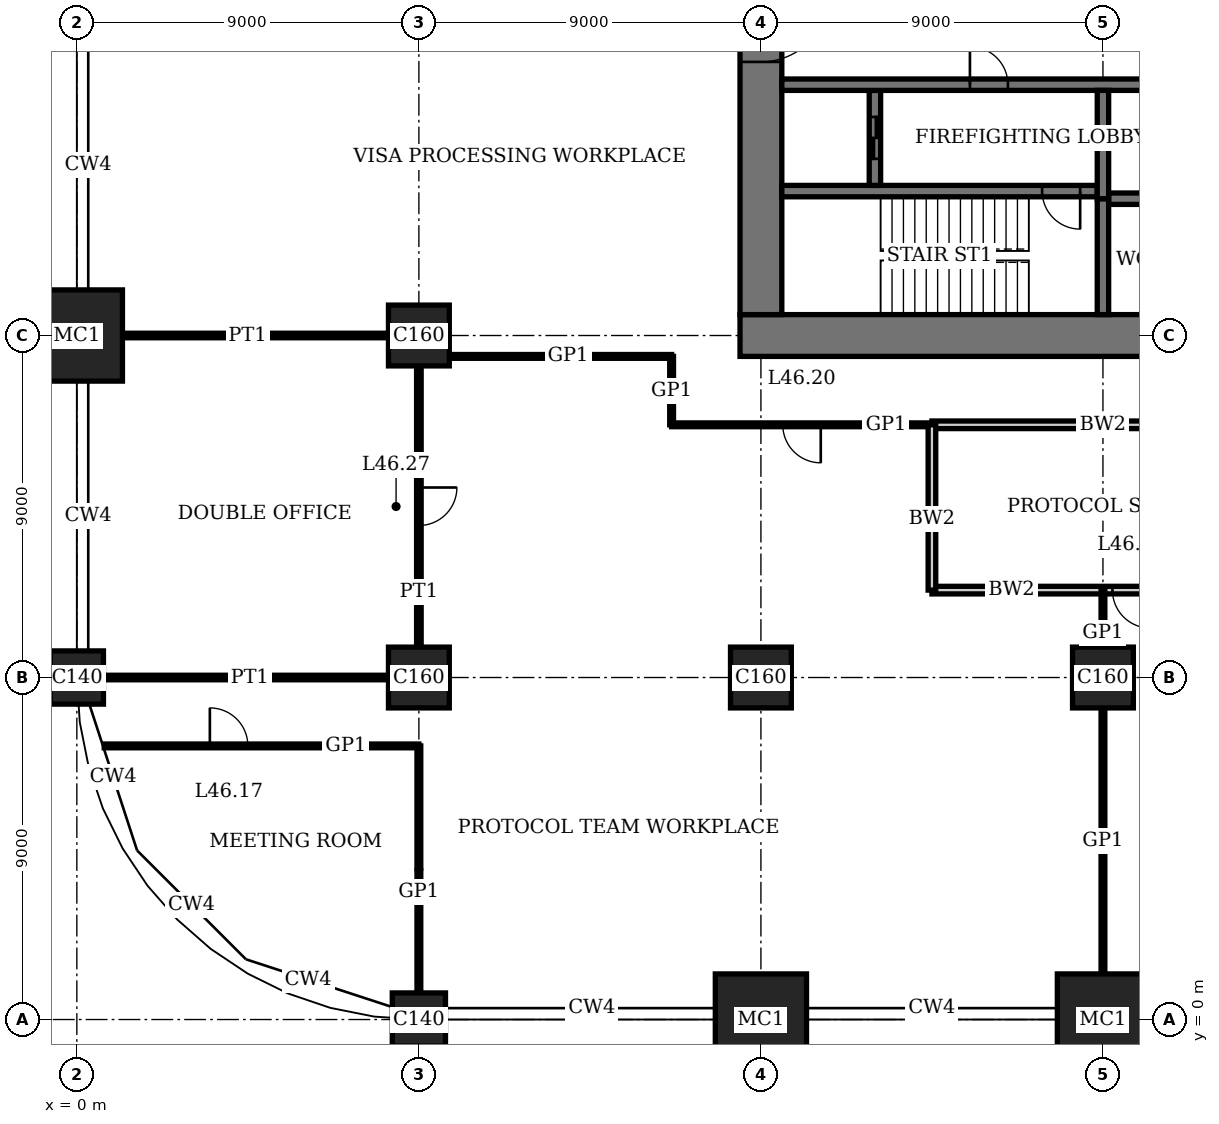
"""IFC4 building model, lengths in metres.
Left out: names, types, materials, properties, quantities, classifications, styles, units other than length and angle.
Written with IfcOpenShell. Run it as: python <this file> out.ifc"""

import sys

from ifc_helpers import new_model, si_unit, direction, frame, frame_2d, origin, origin_2d, place, context, subcontext, project, spatial, rectangle, extrude, element, fill, save


model = new_model("IFC4")
c1 = context("Model", 3, precision=1e-05, world=origin(), true_north=direction((0.0, 1.0)))
c2 = subcontext(c1, "Body", "Model", "MODEL_VIEW")
j1 = project(units=[si_unit("LENGTHUNIT", "METRE"), si_unit("PLANEANGLEUNIT", "RADIAN")], contexts=[c1])
p1 = place(None, origin())
s1 = spatial("IfcSite", under=j1, at=p1, CompositionType="ELEMENT")
p2 = place(p1, origin())
s2 = spatial("IfcBuilding", under=s1, at=p2, CompositionType="ELEMENT")
p3 = place(p2, frame((0.0, 0.0, 190.2)))
s3 = spatial("IfcBuildingStorey", under=s2, at=p3, CompositionType="ELEMENT", Elevation=190.2)
p4 = place(p3, frame((0.0, 9.0, 0.0), z_axis=(0.0, 0.0, 1.0), x_axis=(1.0, 0.0, 0.0)))
e1 = element("IfcColumn", 1, at=p4, inside=s3, PredefinedType="COLUMN", context=c2, shape_type="SweptSolid", body=[
    extrude(rectangle(XDim=1.4, YDim=1.4, at=origin_2d()), origin(), (0.0, 0.0, 1.0), 4.0),
])
p5 = place(p3, frame((0.0, 18.0, 0.0), z_axis=(0.0, 0.0, 1.0), x_axis=(1.0, 0.0, 0.0)))
e2 = element("IfcColumn", 2, at=p5, inside=s3, PredefinedType="COLUMN", context=c2, shape_type="SweptSolid", body=[
    extrude(rectangle(XDim=2.4, YDim=2.4, at=origin_2d()), origin(), (0.0, 0.0, 1.0), 4.0),
])
p6 = place(p3, frame((9.0, 0.0, 0.0), z_axis=(0.0, 0.0, 1.0), x_axis=(1.0, 0.0, 0.0)))
e3 = element("IfcColumn", 3, at=p6, inside=s3, PredefinedType="COLUMN", context=c2, shape_type="SweptSolid", body=[
    extrude(rectangle(XDim=1.4, YDim=1.4, at=origin_2d()), origin(), (0.0, 0.0, 1.0), 4.0),
])
for number, where, z_axis, x_axis in (
    (4, (9.0, 9.0, 0.0), (0.0, 0.0, 1.0), (1.0, 0.0, 0.0)),
    (5, (9.0, 18.0, 0.0), (0.0, 0.0, 1.0), (1.0, 0.0, 0.0)),
):
    element("IfcColumn", number, at=place(p3, frame(where, z_axis=z_axis, x_axis=x_axis)), inside=s3, PredefinedType="COLUMN", context=c2, shape_type="SweptSolid", body=[
        extrude(rectangle(XDim=1.6, YDim=1.6, at=origin_2d()), origin(), (0.0, 0.0, 1.0), 4.0),
    ])
p7 = place(p3, frame((18.0, 0.0, 0.0), z_axis=(0.0, 0.0, 1.0), x_axis=(1.0, 0.0, 0.0)))
e6 = element("IfcColumn", 6, at=p7, inside=s3, PredefinedType="COLUMN", context=c2, shape_type="SweptSolid", body=[
    extrude(rectangle(XDim=2.4, YDim=2.4, at=origin_2d()), origin(), (0.0, 0.0, 1.0), 4.0),
])
p8 = place(p3, frame((18.0, 9.0, 0.0), z_axis=(0.0, 0.0, 1.0), x_axis=(1.0, 0.0, 0.0)))
e7 = element("IfcColumn", 7, at=p8, inside=s3, PredefinedType="COLUMN", context=c2, shape_type="SweptSolid", body=[
    extrude(rectangle(XDim=1.6, YDim=1.6, at=origin_2d()), origin(), (0.0, 0.0, 1.0), 4.0),
])
p9 = place(p3, frame((27.0, 0.0, 0.0), z_axis=(0.0, 0.0, 1.0), x_axis=(1.0, 0.0, 0.0)))
e8 = element("IfcColumn", 8, at=p9, inside=s3, PredefinedType="COLUMN", context=c2, shape_type="SweptSolid", body=[
    extrude(rectangle(XDim=2.4, YDim=2.4, at=origin_2d()), origin(), (0.0, 0.0, 1.0), 4.0),
])
p10 = place(p3, frame((27.0, 9.0, 0.0), z_axis=(0.0, 0.0, 1.0), x_axis=(1.0, 0.0, 0.0)))
e9 = element("IfcColumn", 9, at=p10, inside=s3, PredefinedType="COLUMN", context=c2, shape_type="SweptSolid", body=[
    extrude(rectangle(XDim=1.6, YDim=1.6, at=origin_2d()), origin(), (0.0, 0.0, 1.0), 4.0),
])
p11 = place(p3, frame((17.45, 18.0, 0.0), z_axis=(0.0, 0.0, 1.0), x_axis=(1.0, 0.0, 0.0)))
e10 = element("IfcWall", 10, at=p11, inside=s3, PredefinedType="SHEAR", context=c2, shape_type="SweptSolid", body=[
    extrude(rectangle(XDim=28.1, YDim=1.1, at=frame_2d((14.05, 0.0))), origin(), (0.0, 0.0, 1.0), 4.0),
])
p12 = place(p11, frame((11.55, 0.0, 0.0)))
e11 = element("IfcOpeningElement", 11, at=p12, cuts=e10, PredefinedType="OPENING", context=c2, shape_type="SweptSolid", body=[
    extrude(rectangle(XDim=1.0, YDim=2.4, at=frame_2d((0.5, 1.2))), frame((0.0, 0.56, 0.0), z_axis=(0.0, -1.0, 0.0), x_axis=(1.0, 0.0, 0.0)), (0.0, 0.0, 1.0), 1.12),
])
p13 = place(p11, frame((16.55, 0.0, 0.0)))
e12 = element("IfcOpeningElement", 12, at=p13, cuts=e10, PredefinedType="OPENING", context=c2, shape_type="SweptSolid", body=[
    extrude(rectangle(XDim=1.0, YDim=2.4, at=frame_2d((0.5, 1.2))), frame((0.0, 0.56, 0.0), z_axis=(0.0, -1.0, 0.0), x_axis=(1.0, 0.0, 0.0)), (0.0, 0.0, 1.0), 1.12),
])
p14 = place(p11, frame((20.0, 0.0, 0.0)))
e13 = element("IfcOpeningElement", 13, at=p14, cuts=e10, PredefinedType="OPENING", context=c2, shape_type="SweptSolid", body=[
    extrude(rectangle(XDim=1.1, YDim=2.4, at=frame_2d((0.55, 1.2))), frame((0.0, 0.56, 0.0), z_axis=(0.0, -1.0, 0.0), x_axis=(1.0, 0.0, 0.0)), (0.0, 0.0, 1.0), 1.12),
])
p15 = place(p11, frame((24.05, 0.0, 0.0)))
e14 = element("IfcOpeningElement", 14, at=p15, cuts=e10, PredefinedType="OPENING", context=c2, shape_type="SweptSolid", body=[
    extrude(rectangle(XDim=1.0, YDim=2.4, at=frame_2d((0.5, 1.2))), frame((0.0, 0.56, 0.0), z_axis=(0.0, -1.0, 0.0), x_axis=(1.0, 0.0, 0.0)), (0.0, 0.0, 1.0), 1.12),
])
p16 = place(p3, frame((18.0, 35.45, 0.0), z_axis=(0.0, 0.0, 1.0), x_axis=(0.0, -1.0, 0.0)))
e15 = element("IfcWall", 15, at=p16, inside=s3, PredefinedType="SHEAR", context=c2, shape_type="SweptSolid", body=[
    extrude(rectangle(XDim=16.9, YDim=1.1, at=frame_2d((8.45, 0.0))), origin(), (0.0, 0.0, 1.0), 4.0),
])
p17 = place(p16, frame((8.45, 0.0, 0.0)))
e16 = element("IfcOpeningElement", 16, at=p17, cuts=e15, PredefinedType="OPENING", context=c2, shape_type="SweptSolid", body=[
    extrude(rectangle(XDim=1.8, YDim=2.4, at=frame_2d((0.9, 1.2))), frame((0.0, 0.56, 0.0), z_axis=(0.0, -1.0, 0.0), x_axis=(1.0, 0.0, 0.0)), (0.0, 0.0, 1.0), 1.12),
])
p18 = place(p3, frame((18.55, 21.8, 0.0), z_axis=(0.0, 0.0, 1.0), x_axis=(1.0, 0.0, 0.0)))
e17 = element("IfcWall", 17, at=p18, inside=s3, PredefinedType="SHEAR", context=c2, shape_type="SweptSolid", body=[
    extrude(rectangle(XDim=8.3, YDim=0.3, at=frame_2d((4.15, 0.0))), origin(), (0.0, 0.0, 1.0), 4.0),
])
p19 = place(p18, frame((6.85, 0.0, 0.0)))
e18 = element("IfcOpeningElement", 18, at=p19, cuts=e17, PredefinedType="OPENING", context=c2, shape_type="SweptSolid", body=[
    extrude(rectangle(XDim=1.0, YDim=2.4, at=frame_2d((0.5, 1.2))), frame((0.0, 0.16, 0.0), z_axis=(0.0, -1.0, 0.0), x_axis=(1.0, 0.0, 0.0)), (0.0, 0.0, 1.0), 0.32),
])
p20 = place(p3, frame((27.0, 18.55, 0.0), z_axis=(0.0, 0.0, 1.0), x_axis=(0.0, 1.0, 0.0)))
e19 = element("IfcWall", 19, at=p20, inside=s3, PredefinedType="SHEAR", context=c2, shape_type="SweptSolid", body=[
    extrude(rectangle(XDim=3.05, YDim=0.3, at=frame_2d((1.525, 0.0))), origin(), (0.0, 0.0, 1.0), 4.0),
])
p21 = place(p3, frame((21.0, 21.95, 0.0), z_axis=(0.0, 0.0, 1.0), x_axis=(0.0, 1.0, 0.0)))
e20 = element("IfcWall", 20, at=p21, inside=s3, PredefinedType="SHEAR", context=c2, shape_type="SweptSolid", body=[
    extrude(rectangle(XDim=2.5, YDim=0.3, at=frame_2d((1.25, 0.0))), origin(), (0.0, 0.0, 1.0), 4.0),
])
p22 = place(p21, frame((0.7, 0.0, 0.0)))
e21 = element("IfcOpeningElement", 21, at=p22, cuts=e20, PredefinedType="OPENING", context=c2, shape_type="SweptSolid", body=[
    extrude(rectangle(XDim=1.1, YDim=2.4, at=frame_2d((0.55, 1.2))), frame((0.0, 0.16, 0.0), z_axis=(0.0, -1.0, 0.0), x_axis=(1.0, 0.0, 0.0)), (0.0, 0.0, 1.0), 0.32),
])
p23 = place(p3, frame((18.55, 24.6, 0.0), z_axis=(0.0, 0.0, 1.0), x_axis=(1.0, 0.0, 0.0)))
e22 = element("IfcWall", 22, at=p23, inside=s3, PredefinedType="SHEAR", context=c2, shape_type="SweptSolid", body=[
    extrude(rectangle(XDim=25.9, YDim=0.3, at=frame_2d((12.95, 0.0))), origin(), (0.0, 0.0, 1.0), 4.0),
])
p24 = place(p23, frame((4.95, 0.0, 0.0)))
e23 = element("IfcOpeningElement", 23, at=p24, cuts=e22, PredefinedType="OPENING", context=c2, shape_type="SweptSolid", body=[
    extrude(rectangle(XDim=1.0, YDim=2.4, at=frame_2d((0.5, 1.2))), frame((0.0, 0.16, 0.0), z_axis=(0.0, -1.0, 0.0), x_axis=(1.0, 0.0, 0.0)), (0.0, 0.0, 1.0), 0.32),
])
p25 = place(p23, frame((24.5, 0.0, 0.0)))
e24 = element("IfcOpeningElement", 24, at=p25, cuts=e22, PredefinedType="OPENING", context=c2, shape_type="SweptSolid", body=[
    extrude(rectangle(XDim=0.9, YDim=2.1, at=frame_2d((0.45, 1.05))), frame((0.0, 0.16, 0.0), z_axis=(0.0, -1.0, 0.0), x_axis=(1.0, 0.0, 0.0)), (0.0, 0.0, 1.0), 0.32),
])
p26 = place(p23, frame((21.3, 0.0, 0.0)))
e25 = element("IfcOpeningElement", 25, at=p26, cuts=e22, PredefinedType="OPENING", context=c2, shape_type="SweptSolid", body=[
    extrude(rectangle(XDim=1.3, YDim=2.4, at=frame_2d((0.65, 1.2))), frame((0.0, 0.16, 0.0), z_axis=(0.0, -1.0, 0.0), x_axis=(1.0, 0.0, 0.0)), (0.0, 0.0, 1.0), 0.32),
])
p27 = place(p3, frame((27.15, 21.6, 0.0), z_axis=(0.0, 0.0, 1.0), x_axis=(1.0, 0.0, 0.0)))
e26 = element("IfcWall", 26, at=p27, inside=s3, PredefinedType="SHEAR", context=c2, shape_type="SweptSolid", body=[
    extrude(rectangle(XDim=17.3, YDim=0.3, at=frame_2d((8.65, 0.0))), origin(), (0.0, 0.0, 1.0), 4.0),
])
p28 = place(p3, frame((27.0, 21.6, 0.0), z_axis=(0.0, 0.0, 1.0), x_axis=(0.0, 1.0, 0.0)))
e27 = element("IfcWall", 27, at=p28, inside=s3, PredefinedType="SHEAR", context=c2, shape_type="SweptSolid", body=[
    extrude(rectangle(XDim=2.85, YDim=0.3, at=frame_2d((1.425, 0.0))), origin(), (0.0, 0.0, 1.0), 4.0),
])
p29 = place(p3, frame((0.72, 7.2, 0.0), z_axis=(0.0, 0.0, 1.0), x_axis=(1.0, 0.0, 0.0)))
e28 = element("IfcWall", 28, at=p29, inside=s3, PredefinedType="PARTITIONING", context=c2, shape_type="SweptSolid", body=[
    extrude(rectangle(XDim=8.28, YDim=0.1, at=frame_2d((4.14, 0.0))), origin(), (0.0, 0.0, 1.0), 3.75),
])
p30 = place(p29, frame((2.78, 0.0, 0.0)))
e29 = element("IfcOpeningElement", 29, at=p30, cuts=e28, PredefinedType="OPENING", context=c2, shape_type="SweptSolid", body=[
    extrude(rectangle(XDim=1.0, YDim=2.4, at=frame_2d((0.5, 1.2))), frame((0.0, 0.06, 0.0), z_axis=(0.0, -1.0, 0.0), x_axis=(1.0, 0.0, 0.0)), (0.0, 0.0, 1.0), 0.12),
])
p31 = place(p3, frame((0.7, 9.0, 0.0), z_axis=(0.0, 0.0, 1.0), x_axis=(1.0, 0.0, 0.0)))
e30 = element("IfcWall", 30, at=p31, inside=s3, PredefinedType="PARTITIONING", context=c2, shape_type="SweptSolid", body=[
    extrude(rectangle(XDim=7.5, YDim=0.12, at=frame_2d((3.75, 0.0))), origin(), (0.0, 0.0, 1.0), 3.05),
])
p32 = place(p3, frame((22.5, 11.3, 0.0), z_axis=(0.0, 0.0, 1.0), x_axis=(1.0, 0.0, 0.0)))
e31 = element("IfcWall", 31, at=p32, inside=s3, PredefinedType="SOLIDWALL", context=c2, shape_type="SweptSolid", body=[
    extrude(rectangle(XDim=9.0, YDim=0.2, at=frame_2d((4.5, 0.0))), origin(), (0.0, 0.0, 1.0), 3.75),
])
p33 = place(p32, frame((4.75, 0.0, 0.0)))
e32 = element("IfcOpeningElement", 32, at=p33, cuts=e31, PredefinedType="OPENING", context=c2, shape_type="SweptSolid", body=[
    extrude(rectangle(XDim=1.0, YDim=2.4, at=frame_2d((0.5, 1.2))), frame((0.0, 0.11, 0.0), z_axis=(0.0, -1.0, 0.0), x_axis=(1.0, 0.0, 0.0)), (0.0, 0.0, 1.0), 0.22),
])
p34 = place(p3, frame((22.5, 15.65, 0.0), z_axis=(0.0, 0.0, 1.0), x_axis=(1.0, 0.0, 0.0)))
e33 = element("IfcWall", 33, at=p34, inside=s3, PredefinedType="SOLIDWALL", context=c2, shape_type="SweptSolid", body=[
    extrude(rectangle(XDim=9.0, YDim=0.2, at=frame_2d((4.5, 0.0))), origin(), (0.0, 0.0, 1.0), 3.75),
])
p35 = place(p3, frame((15.65, 15.65, 0.0), z_axis=(0.0, 0.0, 1.0), x_axis=(1.0, 0.0, 0.0)))
e34 = element("IfcWall", 34, at=p35, inside=s3, PredefinedType="PARTITIONING", context=c2, shape_type="SweptSolid", body=[
    extrude(rectangle(XDim=6.85, YDim=0.1, at=frame_2d((3.425, 0.0))), origin(), (0.0, 0.0, 1.0), 3.75),
])
p36 = place(p35, frame((2.925, 0.0, 0.0)))
e35 = element("IfcOpeningElement", 35, at=p36, cuts=e34, PredefinedType="OPENING", context=c2, shape_type="SweptSolid", body=[
    extrude(rectangle(XDim=1.0, YDim=2.4, at=frame_2d((0.5, 1.2))), frame((0.0, 0.06, 0.0), z_axis=(0.0, -1.0, 0.0), x_axis=(1.0, 0.0, 0.0)), (0.0, 0.0, 1.0), 0.12),
])
p37 = place(p3, frame((9.8, 17.45, 0.0), z_axis=(0.0, 0.0, 1.0), x_axis=(1.0, 0.0, 0.0)))
e36 = element("IfcWall", 36, at=p37, inside=s3, PredefinedType="PARTITIONING", context=c2, shape_type="SweptSolid", body=[
    extrude(rectangle(XDim=5.85, YDim=0.1, at=frame_2d((2.925, 0.0))), origin(), (0.0, 0.0, 1.0), 3.75),
])
p38 = place(p3, frame((1.2, 18.0, 0.0), z_axis=(0.0, 0.0, 1.0), x_axis=(1.0, 0.0, 0.0)))
e37 = element("IfcWall", 37, at=p38, inside=s3, PredefinedType="PARTITIONING", context=c2, shape_type="SweptSolid", body=[
    extrude(rectangle(XDim=7.0, YDim=0.12, at=frame_2d((3.5, 0.0))), origin(), (0.0, 0.0, 1.0), 3.05),
])
p39 = place(p3, frame((9.0, 9.8, 0.0), z_axis=(0.0, 0.0, 1.0), x_axis=(0.0, 1.0, 0.0)))
e38 = element("IfcWall", 38, at=p39, inside=s3, PredefinedType="PARTITIONING", context=c2, shape_type="SweptSolid", body=[
    extrude(rectangle(XDim=7.4, YDim=0.12, at=frame_2d((3.7, 0.0))), origin(), (0.0, 0.0, 1.0), 3.05),
])
p40 = place(p39, frame((3.2, 0.0, 0.0)))
e39 = element("IfcOpeningElement", 39, at=p40, cuts=e38, PredefinedType="OPENING", context=c2, shape_type="SweptSolid", body=[
    extrude(rectangle(XDim=1.0, YDim=2.4, at=frame_2d((0.5, 1.2))), frame((0.0, 0.07, 0.0), z_axis=(0.0, -1.0, 0.0), x_axis=(1.0, 0.0, 0.0)), (0.0, 0.0, 1.0), 0.14),
])
p41 = place(p3, frame((9.0, 0.7, 0.0), z_axis=(0.0, 0.0, 1.0), x_axis=(0.0, 1.0, 0.0)))
e40 = element("IfcWall", 40, at=p41, inside=s3, PredefinedType="PARTITIONING", context=c2, shape_type="SweptSolid", body=[
    extrude(rectangle(XDim=6.5, YDim=0.1, at=frame_2d((3.25, 0.0))), origin(), (0.0, 0.0, 1.0), 3.05),
])
p42 = place(p3, frame((15.65, 15.65, 0.0), z_axis=(0.0, 0.0, 1.0), x_axis=(0.0, 1.0, 0.0)))
e41 = element("IfcWall", 41, at=p42, inside=s3, PredefinedType="PARTITIONING", context=c2, shape_type="SweptSolid", body=[
    extrude(rectangle(XDim=1.8, YDim=0.1, at=frame_2d((0.9, 0.0))), origin(), (0.0, 0.0, 1.0), 3.75),
])
p43 = place(p3, frame((22.5, 11.3, 0.0), z_axis=(0.0, 0.0, 1.0), x_axis=(0.0, 1.0, 0.0)))
e42 = element("IfcWall", 42, at=p43, inside=s3, PredefinedType="SOLIDWALL", context=c2, shape_type="SweptSolid", body=[
    extrude(rectangle(XDim=4.35, YDim=0.2, at=frame_2d((2.175, 0.0))), origin(), (0.0, 0.0, 1.0), 3.75),
])
p44 = place(p3, frame((27.0, 1.2, 0.0), z_axis=(0.0, 0.0, 1.0), x_axis=(0.0, 1.0, 0.0)))
e43 = element("IfcWall", 43, at=p44, inside=s3, PredefinedType="PARTITIONING", context=c2, shape_type="SweptSolid", body=[
    extrude(rectangle(XDim=7.0, YDim=0.1, at=frame_2d((3.5, 0.0))), origin(), (0.0, 0.0, 1.0), 3.05),
])
p45 = place(p3, frame((27.0, 9.8, 0.0), z_axis=(0.0, 0.0, 1.0), x_axis=(0.0, 1.0, 0.0)))
e44 = element("IfcWall", 44, at=p45, inside=s3, PredefinedType="PARTITIONING", context=c2, shape_type="SweptSolid", body=[
    extrude(rectangle(XDim=1.51, YDim=0.1, at=frame_2d((0.755, 0.0))), origin(), (0.0, 0.0, 1.0), 3.05),
])
p46 = place(p17, origin())
e45 = element("IfcDoor", 45, at=p46, inside=s3, OperationType="DOUBLE_DOOR_DOUBLE_SWING", PredefinedType="DOOR", context=c2, shape_type="SweptSolid", body=[
    extrude(rectangle(XDim=1.8, YDim=2.4, at=frame_2d((0.9, 1.2))), frame((0.0, 0.03, 0.0), z_axis=(0.0, -1.0, 0.0), x_axis=(1.0, 0.0, 0.0)), (0.0, 0.0, 1.0), 0.06),
    extrude(rectangle(XDim=0.04, YDim=2.4, at=frame_2d((0.02, 1.2))), frame((0.0, 0.55, 0.0), z_axis=(0.0, -1.0, 0.0), x_axis=(1.0, 0.0, 0.0)), (0.0, 0.0, 1.0), 1.1),
    extrude(rectangle(XDim=0.04, YDim=2.4, at=frame_2d((1.78, 1.2))), frame((0.0, 0.55, 0.0), z_axis=(0.0, -1.0, 0.0), x_axis=(1.0, 0.0, 0.0)), (0.0, 0.0, 1.0), 1.1),
    extrude(rectangle(XDim=1.8, YDim=0.04, at=frame_2d((0.9, 2.38))), frame((0.0, 0.55, 0.0), z_axis=(0.0, -1.0, 0.0), x_axis=(1.0, 0.0, 0.0)), (0.0, 0.0, 1.0), 1.1),
])
fill(e16, e45)
p47 = place(p19, origin())
e46 = element("IfcDoor", 46, at=p47, inside=s3, OperationType="SINGLE_SWING_RIGHT", PredefinedType="DOOR", context=c2, shape_type="SweptSolid", body=[
    extrude(rectangle(XDim=1.0, YDim=2.4, at=frame_2d((0.5, 1.2))), frame((0.0, 0.03, 0.0), z_axis=(0.0, -1.0, 0.0), x_axis=(1.0, 0.0, 0.0)), (0.0, 0.0, 1.0), 0.06),
])
fill(e18, e46)
p48 = place(p24, origin())
e47 = element("IfcDoor", 47, at=p48, inside=s3, OperationType="SINGLE_SWING_RIGHT", PredefinedType="DOOR", context=c2, shape_type="SweptSolid", body=[
    extrude(rectangle(XDim=1.0, YDim=2.4, at=frame_2d((0.5, 1.2))), frame((0.0, 0.03, 0.0), z_axis=(0.0, -1.0, 0.0), x_axis=(1.0, 0.0, 0.0)), (0.0, 0.0, 1.0), 0.06),
])
fill(e23, e47)
p49 = place(p30, origin())
e48 = element("IfcDoor", 48, at=p49, inside=s3, OperationType="SINGLE_SWING_RIGHT", PredefinedType="DOOR", context=c2, shape_type="SweptSolid", body=[
    extrude(rectangle(XDim=1.0, YDim=2.4, at=frame_2d((0.5, 1.2))), frame((0.0, 0.02, 0.0), z_axis=(0.0, -1.0, 0.0), x_axis=(1.0, 0.0, 0.0)), (0.0, 0.0, 1.0), 0.04),
])
fill(e29, e48)
p50 = place(p33, origin())
e49 = element("IfcDoor", 49, at=p50, inside=s3, OperationType="SINGLE_SWING_RIGHT", PredefinedType="DOOR", context=c2, shape_type="SweptSolid", body=[
    extrude(rectangle(XDim=1.0, YDim=2.4, at=frame_2d((0.5, 1.2))), frame((0.0, 0.035, 0.0), z_axis=(0.0, -1.0, 0.0), x_axis=(1.0, 0.0, 0.0)), (0.0, 0.0, 1.0), 0.07),
])
fill(e32, e49)
p51 = place(p36, origin())
e50 = element("IfcDoor", 50, at=p51, inside=s3, OperationType="SINGLE_SWING_RIGHT", PredefinedType="DOOR", context=c2, shape_type="SweptSolid", body=[
    extrude(rectangle(XDim=1.0, YDim=2.4, at=frame_2d((0.5, 1.2))), frame((0.0, 0.02, 0.0), z_axis=(0.0, -1.0, 0.0), x_axis=(1.0, 0.0, 0.0)), (0.0, 0.0, 1.0), 0.04),
])
fill(e35, e50)
p52 = place(p40, origin())
e51 = element("IfcDoor", 51, at=p52, inside=s3, OperationType="SINGLE_SWING_RIGHT", PredefinedType="DOOR", context=c2, shape_type="SweptSolid", body=[
    extrude(rectangle(XDim=1.0, YDim=2.4, at=frame_2d((0.5, 1.2))), frame((0.0, 0.025, 0.0), z_axis=(0.0, -1.0, 0.0), x_axis=(1.0, 0.0, 0.0)), (0.0, 0.0, 1.0), 0.05),
])
fill(e39, e51)
p53 = place(p22, origin())
e52 = element("IfcDoor", 52, at=p53, inside=s3, OperationType="DOUBLE_DOOR_SLIDING", PredefinedType="DOOR", context=c2, shape_type="SweptSolid", body=[
    extrude(rectangle(XDim=1.1, YDim=2.4, at=frame_2d((0.55, 1.2))), frame((0.0, 0.03, 0.0), z_axis=(0.0, -1.0, 0.0), x_axis=(1.0, 0.0, 0.0)), (0.0, 0.0, 1.0), 0.06),
])
fill(e21, e52)
save(model, sys.argv[1])
